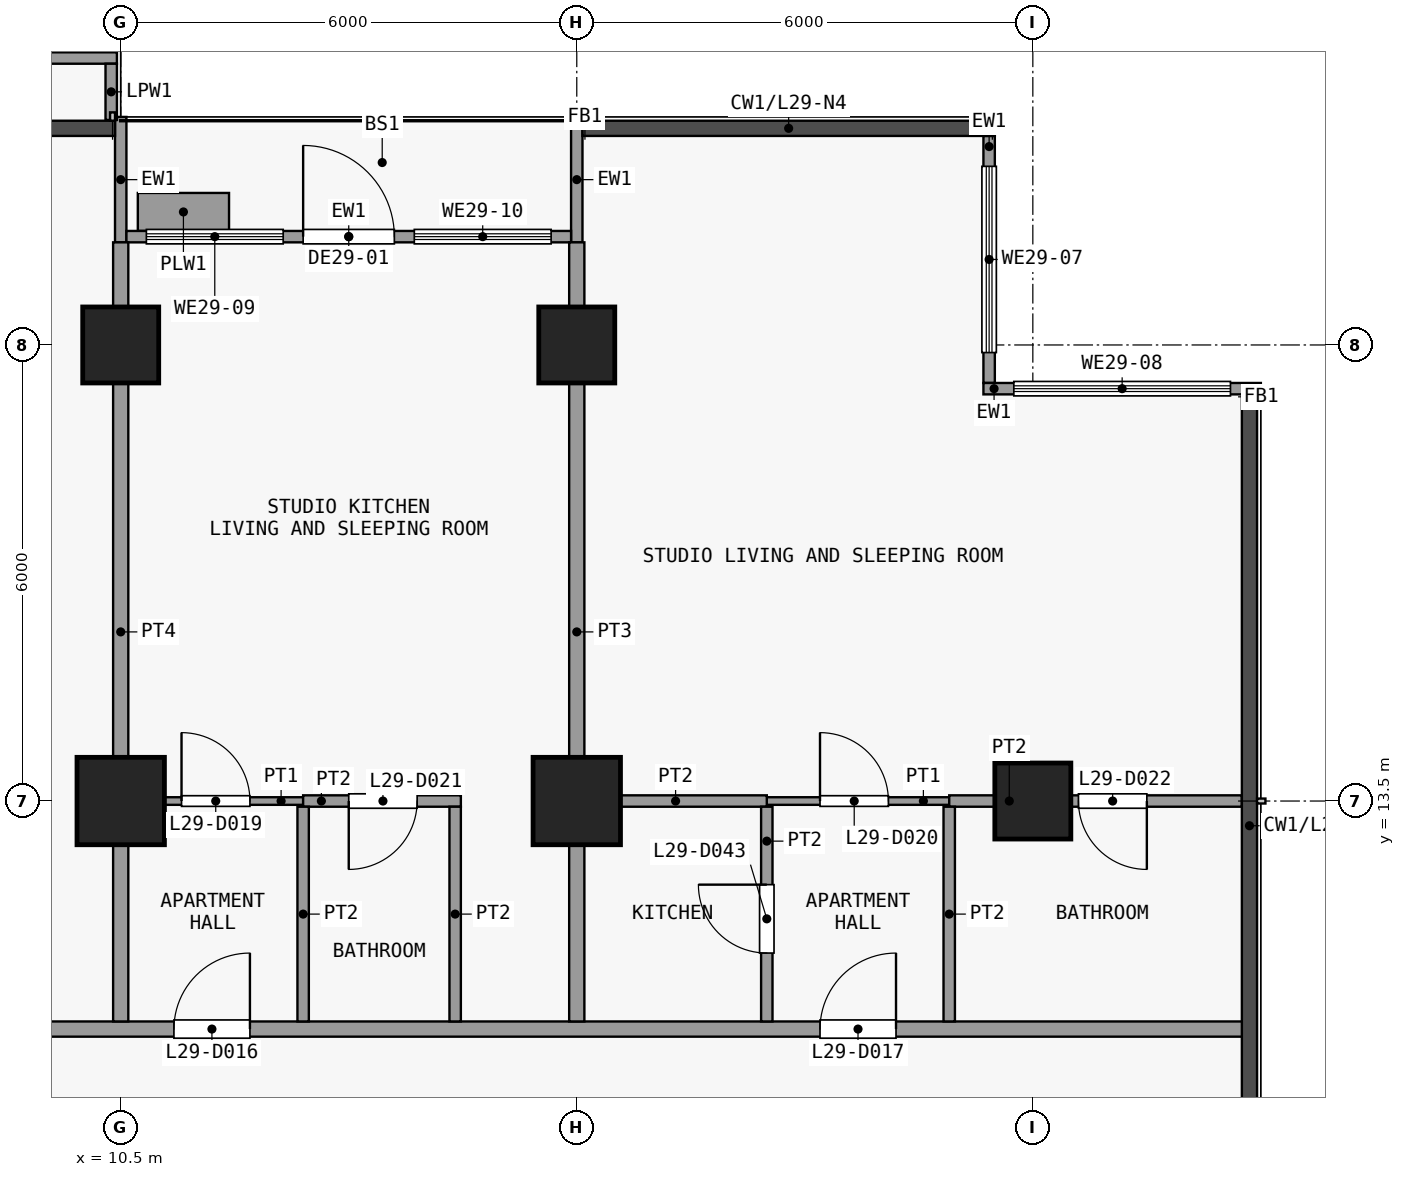
"""IFC4 building model, lengths in metres.
Left out: names, types, materials, properties, quantities, classifications, styles, units other than length and angle.
Written with IfcOpenShell. Run it as: python <this file> out.ifc"""

import sys

from ifc_helpers import new_model, si_unit, direction, frame, frame_2d, origin, origin_2d, place, context, subcontext, project, spatial, rectangle, extrude, element, fill, save


model = new_model("IFC4")
c1 = context("Model", 3, precision=1e-05, world=origin(), true_north=direction((0.0, 1.0)))
c2 = subcontext(c1, "Body", "Model", "MODEL_VIEW")
j1 = project(units=[si_unit("LENGTHUNIT", "METRE"), si_unit("PLANEANGLEUNIT", "RADIAN")], contexts=[c1])
p1 = place(None, origin())
s1 = spatial("IfcSite", under=j1, at=p1, CompositionType="ELEMENT")
p2 = place(p1, origin())
s2 = spatial("IfcBuilding", under=s1, at=p2, CompositionType="ELEMENT")
p3 = place(p2, frame((0.0, 0.0, 117.1)))
s3 = spatial("IfcBuildingStorey", under=s2, at=p3, CompositionType="ELEMENT", Elevation=117.1)
p4 = place(p3, frame((10.5, 13.5, 0.0), z_axis=(0.0, 0.0, 1.0), x_axis=(1.0, 0.0, 0.0)))
e1 = element("IfcColumn", 1, at=p4, inside=s3, PredefinedType="COLUMN", context=c2, shape_type="SweptSolid", body=[
    extrude(rectangle(XDim=1.15, YDim=1.15, at=origin_2d()), origin(), (0.0, 0.0, 1.0), 3.6),
])
p5 = place(p3, frame((10.5, 19.5, 0.0), z_axis=(0.0, 0.0, 1.0), x_axis=(1.0, 0.0, 0.0)))
e2 = element("IfcColumn", 2, at=p5, inside=s3, PredefinedType="COLUMN", context=c2, shape_type="SweptSolid", body=[
    extrude(rectangle(XDim=1.0, YDim=1.0, at=origin_2d()), origin(), (0.0, 0.0, 1.0), 3.6),
])
p6 = place(p3, frame((16.5, 13.5, 0.0), z_axis=(0.0, 0.0, 1.0), x_axis=(1.0, 0.0, 0.0)))
e3 = element("IfcColumn", 3, at=p6, inside=s3, PredefinedType="COLUMN", context=c2, shape_type="SweptSolid", body=[
    extrude(rectangle(XDim=1.15, YDim=1.15, at=origin_2d()), origin(), (0.0, 0.0, 1.0), 3.6),
])
for number, where, z_axis, x_axis in (
    (4, (16.5, 19.5, 0.0), (0.0, 0.0, 1.0), (1.0, 0.0, 0.0)),
    (5, (22.5, 13.5, 0.0), (0.0, 0.0, 1.0), (1.0, 0.0, 0.0)),
):
    element("IfcColumn", number, at=place(p3, frame(where, z_axis=z_axis, x_axis=x_axis)), inside=s3, PredefinedType="COLUMN", context=c2, shape_type="SweptSolid", body=[
        extrude(rectangle(XDim=1.0, YDim=1.0, at=origin_2d()), origin(), (0.0, 0.0, 1.0), 3.6),
    ])
p7 = place(p3, frame((21.925, 22.25, 0.0), z_axis=(0.0, 0.0, 1.0), x_axis=(0.0, -1.0, 0.0)))
e6 = element("IfcWall", 6, at=p7, inside=s3, PredefinedType="SOLIDWALL", context=c2, shape_type="SweptSolid", body=[
    extrude(rectangle(XDim=3.25, YDim=0.15, at=frame_2d((1.625, 0.0))), origin(), (0.0, 0.0, 1.0), 3.3),
])
p8 = place(p7, frame((0.4, 0.0, 0.9)))
e7 = element("IfcOpeningElement", 7, at=p8, cuts=e6, PredefinedType="OPENING", context=c2, shape_type="SweptSolid", body=[
    extrude(rectangle(XDim=2.45, YDim=2.4, at=frame_2d((1.225, 1.2))), frame((0.0, 0.085, 0.0), z_axis=(0.0, -1.0, 0.0), x_axis=(1.0, 0.0, 0.0)), (0.0, 0.0, 1.0), 0.17),
])
p9 = place(p3, frame((21.85, 18.925, 0.0), z_axis=(0.0, 0.0, 1.0), x_axis=(1.0, 0.0, 0.0)))
e8 = element("IfcWall", 8, at=p9, inside=s3, PredefinedType="SOLIDWALL", context=c2, shape_type="SweptSolid", body=[
    extrude(rectangle(XDim=3.65, YDim=0.15, at=frame_2d((1.825, 0.0))), origin(), (0.0, 0.0, 1.0), 3.3),
])
p10 = place(p9, frame((0.4, 0.0, 0.9)))
e9 = element("IfcOpeningElement", 9, at=p10, cuts=e8, PredefinedType="OPENING", context=c2, shape_type="SweptSolid", body=[
    extrude(rectangle(XDim=2.85, YDim=2.4, at=frame_2d((1.425, 1.2))), frame((0.0, 0.085, 0.0), z_axis=(0.0, -1.0, 0.0), x_axis=(1.0, 0.0, 0.0)), (0.0, 0.0, 1.0), 0.17),
])
for number, where, z_axis, x_axis in (
    (10, (10.5, 20.85, 0.0), (0.0, 0.0, 1.0), (0.0, 1.0, 0.0)),
    (11, (16.5, 20.85, 0.0), (0.0, 0.0, 1.0), (0.0, 1.0, 0.0)),
):
    element("IfcWall", number, at=place(p3, frame(where, z_axis=z_axis, x_axis=x_axis)), inside=s3, PredefinedType="SOLIDWALL", context=c2, shape_type="SweptSolid", body=[
        extrude(rectangle(XDim=1.65, YDim=0.15, at=frame_2d((0.825, 0.0))), origin(), (0.0, 0.0, 1.0), 3.3),
    ])
p11 = place(p3, frame((10.575, 20.925, 0.0), z_axis=(0.0, 0.0, 1.0), x_axis=(1.0, 0.0, 0.0)))
e12 = element("IfcWall", 12, at=p11, inside=s3, PredefinedType="SOLIDWALL", context=c2, shape_type="SweptSolid", body=[
    extrude(rectangle(XDim=5.85, YDim=0.15, at=frame_2d((2.925, 0.0))), origin(), (0.0, 0.0, 1.0), 3.3),
])
p12 = place(p11, frame((2.325, 0.0, 0.0)))
e13 = element("IfcOpeningElement", 13, at=p12, cuts=e12, PredefinedType="OPENING", context=c2, shape_type="SweptSolid", body=[
    extrude(rectangle(XDim=1.2, YDim=2.4, at=frame_2d((0.6, 1.2))), frame((0.0, 0.085, 0.0), z_axis=(0.0, -1.0, 0.0), x_axis=(1.0, 0.0, 0.0)), (0.0, 0.0, 1.0), 0.17),
])
p13 = place(p11, frame((0.262, 0.0, 0.9)))
e14 = element("IfcOpeningElement", 14, at=p13, cuts=e12, PredefinedType="OPENING", context=c2, shape_type="SweptSolid", body=[
    extrude(rectangle(XDim=1.8, YDim=2.1, at=frame_2d((0.9, 1.05))), frame((0.0, 0.085, 0.0), z_axis=(0.0, -1.0, 0.0), x_axis=(1.0, 0.0, 0.0)), (0.0, 0.0, 1.0), 0.17),
])
p14 = place(p11, frame((3.788, 0.0, 0.9)))
e15 = element("IfcOpeningElement", 15, at=p14, cuts=e12, PredefinedType="OPENING", context=c2, shape_type="SweptSolid", body=[
    extrude(rectangle(XDim=1.8, YDim=2.1, at=frame_2d((0.9, 1.05))), frame((0.0, 0.085, 0.0), z_axis=(0.0, -1.0, 0.0), x_axis=(1.0, 0.0, 0.0)), (0.0, 0.0, 1.0), 0.17),
])
p15 = place(p3, frame((10.725, 21.25, 0.0), z_axis=(0.0, 0.0, 1.0), x_axis=(1.0, 0.0, 0.0)))
e16 = element("IfcWall", 16, at=p15, inside=s3, PredefinedType="USERDEFINED", context=c2, shape_type="SweptSolid", body=[
    extrude(rectangle(XDim=1.2, YDim=0.5, at=frame_2d((0.6, 0.0))), origin(), (0.0, 0.0, 1.0), 0.9),
])
p16 = place(p3, frame((4.7, 23.275, 0.0), z_axis=(0.0, 0.0, 1.0), x_axis=(1.0, 0.0, 0.0)))
e17 = element("IfcWall", 17, at=p16, inside=s3, PredefinedType="PARAPET", context=c2, shape_type="SweptSolid", body=[
    extrude(rectangle(XDim=5.75, YDim=0.15, at=frame_2d((2.875, 0.0))), origin(), (0.0, 0.0, 1.0), 1.15),
])
p17 = place(p3, frame((10.375, 23.2, 0.0), z_axis=(0.0, 0.0, 1.0), x_axis=(0.0, -1.0, 0.0)))
e18 = element("IfcWall", 18, at=p17, inside=s3, PredefinedType="PARAPET", context=c2, shape_type="SweptSolid", body=[
    extrude(rectangle(XDim=0.74, YDim=0.15, at=frame_2d((0.37, 0.0))), origin(), (0.0, 0.0, 1.0), 1.15),
])
p18 = place(p3, frame((-25.35, 10.5, 0.0), z_axis=(0.0, 0.0, 1.0), x_axis=(1.0, 0.0, 0.0)))
e19 = element("IfcWall", 19, at=p18, inside=s3, PredefinedType="PARTITIONING", context=c2, shape_type="SweptSolid", body=[
    extrude(rectangle(XDim=50.7, YDim=0.2, at=frame_2d((25.35, 0.0))), origin(), (0.0, 0.0, 1.0), 3.3),
])
p19 = place(p18, frame((10.55, 0.0, 0.0)))
e20 = element("IfcOpeningElement", 20, at=p19, cuts=e19, PredefinedType="OPENING", context=c2, shape_type="SweptSolid", body=[
    extrude(rectangle(XDim=1.0, YDim=2.1, at=frame_2d((0.5, 1.05))), frame((0.0, 0.11, 0.0), z_axis=(0.0, -1.0, 0.0), x_axis=(1.0, 0.0, 0.0)), (0.0, 0.0, 1.0), 0.22),
])
p20 = place(p18, frame((17.35, 0.0, 0.0)))
e21 = element("IfcOpeningElement", 21, at=p20, cuts=e19, PredefinedType="OPENING", context=c2, shape_type="SweptSolid", body=[
    extrude(rectangle(XDim=0.9, YDim=2.1, at=frame_2d((0.45, 1.05))), frame((0.0, 0.11, 0.0), z_axis=(0.0, -1.0, 0.0), x_axis=(1.0, 0.0, 0.0)), (0.0, 0.0, 1.0), 0.22),
])
p21 = place(p18, frame((24.85, 0.0, 0.0)))
e22 = element("IfcOpeningElement", 22, at=p21, cuts=e19, PredefinedType="OPENING", context=c2, shape_type="SweptSolid", body=[
    extrude(rectangle(XDim=0.9, YDim=2.1, at=frame_2d((0.45, 1.05))), frame((0.0, 0.11, 0.0), z_axis=(0.0, -1.0, 0.0), x_axis=(1.0, 0.0, 0.0)), (0.0, 0.0, 1.0), 0.22),
])
p22 = place(p18, frame((32.35, 0.0, 0.0)))
e23 = element("IfcOpeningElement", 23, at=p22, cuts=e19, PredefinedType="OPENING", context=c2, shape_type="SweptSolid", body=[
    extrude(rectangle(XDim=0.9, YDim=2.1, at=frame_2d((0.45, 1.05))), frame((0.0, 0.11, 0.0), z_axis=(0.0, -1.0, 0.0), x_axis=(1.0, 0.0, 0.0)), (0.0, 0.0, 1.0), 0.22),
])
p23 = place(p18, frame((36.55, 0.0, 0.0)))
e24 = element("IfcOpeningElement", 24, at=p23, cuts=e19, PredefinedType="OPENING", context=c2, shape_type="SweptSolid", body=[
    extrude(rectangle(XDim=1.0, YDim=2.1, at=frame_2d((0.5, 1.05))), frame((0.0, 0.11, 0.0), z_axis=(0.0, -1.0, 0.0), x_axis=(1.0, 0.0, 0.0)), (0.0, 0.0, 1.0), 0.22),
])
p24 = place(p18, frame((45.05, 0.0, 0.0)))
e25 = element("IfcOpeningElement", 25, at=p24, cuts=e19, PredefinedType="OPENING", context=c2, shape_type="SweptSolid", body=[
    extrude(rectangle(XDim=1.0, YDim=2.1, at=frame_2d((0.5, 1.05))), frame((0.0, 0.11, 0.0), z_axis=(0.0, -1.0, 0.0), x_axis=(1.0, 0.0, 0.0)), (0.0, 0.0, 1.0), 0.22),
])
p25 = place(p3, frame((10.6, 13.5, 0.0), z_axis=(0.0, 0.0, 1.0), x_axis=(1.0, 0.0, 0.0)))
e26 = element("IfcWall", 26, at=p25, inside=s3, PredefinedType="PARTITIONING", context=c2, shape_type="SweptSolid", body=[
    extrude(rectangle(XDim=2.3, YDim=0.1, at=frame_2d((1.15, 0.0))), origin(), (0.0, 0.0, 1.0), 3.3),
])
p26 = place(p25, frame((0.7, 0.0, 0.0)))
e27 = element("IfcOpeningElement", 27, at=p26, cuts=e26, PredefinedType="OPENING", context=c2, shape_type="SweptSolid", body=[
    extrude(rectangle(XDim=0.9, YDim=2.1, at=frame_2d((0.45, 1.05))), frame((0.0, 0.06, 0.0), z_axis=(0.0, -1.0, 0.0), x_axis=(1.0, 0.0, 0.0)), (0.0, 0.0, 1.0), 0.12),
])
p27 = place(p3, frame((19.0, 13.5, 0.0), z_axis=(0.0, 0.0, 1.0), x_axis=(1.0, 0.0, 0.0)))
e28 = element("IfcWall", 28, at=p27, inside=s3, PredefinedType="PARTITIONING", context=c2, shape_type="SweptSolid", body=[
    extrude(rectangle(XDim=2.4, YDim=0.1, at=frame_2d((1.2, 0.0))), origin(), (0.0, 0.0, 1.0), 3.3),
])
p28 = place(p27, frame((0.7, 0.0, 0.0)))
e29 = element("IfcOpeningElement", 29, at=p28, cuts=e28, PredefinedType="OPENING", context=c2, shape_type="SweptSolid", body=[
    extrude(rectangle(XDim=0.9, YDim=2.1, at=frame_2d((0.45, 1.05))), frame((0.0, 0.06, 0.0), z_axis=(0.0, -1.0, 0.0), x_axis=(1.0, 0.0, 0.0)), (0.0, 0.0, 1.0), 0.12),
])
p29 = place(p3, frame((12.9, 13.5, 0.0), z_axis=(0.0, 0.0, 1.0), x_axis=(1.0, 0.0, 0.0)))
e30 = element("IfcWall", 30, at=p29, inside=s3, PredefinedType="PARTITIONING", context=c2, shape_type="SweptSolid", body=[
    extrude(rectangle(XDim=2.075, YDim=0.15, at=frame_2d((1.038, 0.0))), origin(), (0.0, 0.0, 1.0), 3.3),
])
p30 = place(p29, frame((0.6, 0.0, 0.0)))
e31 = element("IfcOpeningElement", 31, at=p30, cuts=e30, PredefinedType="OPENING", context=c2, shape_type="SweptSolid", body=[
    extrude(rectangle(XDim=0.9, YDim=2.1, at=frame_2d((0.45, 1.05))), frame((0.0, 0.085, 0.0), z_axis=(0.0, -1.0, 0.0), x_axis=(1.0, 0.0, 0.0)), (0.0, 0.0, 1.0), 0.17),
])
p31 = place(p3, frame((16.6, 13.5, 0.0), z_axis=(0.0, 0.0, 1.0), x_axis=(1.0, 0.0, 0.0)))
e32 = element("IfcWall", 32, at=p31, inside=s3, PredefinedType="PARTITIONING", context=c2, shape_type="SweptSolid", body=[
    extrude(rectangle(XDim=2.4, YDim=0.15, at=frame_2d((1.2, 0.0))), origin(), (0.0, 0.0, 1.0), 3.3),
])
p32 = place(p3, frame((21.4, 13.5, 0.0), z_axis=(0.0, 0.0, 1.0), x_axis=(1.0, 0.0, 0.0)))
e33 = element("IfcWall", 33, at=p32, inside=s3, PredefinedType="PARTITIONING", context=c2, shape_type="SweptSolid", body=[
    extrude(rectangle(XDim=3.85, YDim=0.15, at=frame_2d((1.925, 0.0))), origin(), (0.0, 0.0, 1.0), 3.3),
])
p33 = place(p32, frame((1.7, 0.0, 0.0)))
e34 = element("IfcOpeningElement", 34, at=p33, cuts=e33, PredefinedType="OPENING", context=c2, shape_type="SweptSolid", body=[
    extrude(rectangle(XDim=0.9, YDim=2.1, at=frame_2d((0.45, 1.05))), frame((0.0, 0.085, 0.0), z_axis=(0.0, -1.0, 0.0), x_axis=(1.0, 0.0, 0.0)), (0.0, 0.0, 1.0), 0.17),
])
p34 = place(p3, frame((10.5, 10.6, 0.0), z_axis=(0.0, 0.0, 1.0), x_axis=(0.0, 1.0, 0.0)))
e35 = element("IfcWall", 35, at=p34, inside=s3, PredefinedType="PARTITIONING", context=c2, shape_type="SweptSolid", body=[
    extrude(rectangle(XDim=10.25, YDim=0.2, at=frame_2d((5.125, 0.0))), origin(), (0.0, 0.0, 1.0), 3.3),
])
for number, where, z_axis, x_axis in (
    (36, (12.9, 10.6, 0.0), (0.0, 0.0, 1.0), (0.0, 1.0, 0.0)),
    (37, (14.9, 10.6, 0.0), (0.0, 0.0, 1.0), (0.0, 1.0, 0.0)),
):
    element("IfcWall", number, at=place(p3, frame(where, z_axis=z_axis, x_axis=x_axis)), inside=s3, PredefinedType="PARTITIONING", context=c2, shape_type="SweptSolid", body=[
        extrude(rectangle(XDim=2.825, YDim=0.15, at=frame_2d((1.413, 0.0))), origin(), (0.0, 0.0, 1.0), 3.3),
    ])
p35 = place(p3, frame((16.5, 10.6, 0.0), z_axis=(0.0, 0.0, 1.0), x_axis=(0.0, 1.0, 0.0)))
e38 = element("IfcWall", 38, at=p35, inside=s3, PredefinedType="PARTITIONING", context=c2, shape_type="SweptSolid", body=[
    extrude(rectangle(XDim=10.25, YDim=0.2, at=frame_2d((5.125, 0.0))), origin(), (0.0, 0.0, 1.0), 3.3),
])
p36 = place(p3, frame((19.0, 10.6, 0.0), z_axis=(0.0, 0.0, 1.0), x_axis=(0.0, 1.0, 0.0)))
e39 = element("IfcWall", 39, at=p36, inside=s3, PredefinedType="PARTITIONING", context=c2, shape_type="SweptSolid", body=[
    extrude(rectangle(XDim=2.825, YDim=0.15, at=frame_2d((1.413, 0.0))), origin(), (0.0, 0.0, 1.0), 3.3),
])
p37 = place(p36, frame((0.9, 0.0, 0.0)))
e40 = element("IfcOpeningElement", 40, at=p37, cuts=e39, PredefinedType="OPENING", context=c2, shape_type="SweptSolid", body=[
    extrude(rectangle(XDim=0.9, YDim=2.1, at=frame_2d((0.45, 1.05))), frame((0.0, 0.085, 0.0), z_axis=(0.0, -1.0, 0.0), x_axis=(1.0, 0.0, 0.0)), (0.0, 0.0, 1.0), 0.17),
])
p38 = place(p3, frame((21.4, 10.6, 0.0), z_axis=(0.0, 0.0, 1.0), x_axis=(0.0, 1.0, 0.0)))
e41 = element("IfcWall", 41, at=p38, inside=s3, PredefinedType="PARTITIONING", context=c2, shape_type="SweptSolid", body=[
    extrude(rectangle(XDim=2.825, YDim=0.15, at=frame_2d((1.413, 0.0))), origin(), (0.0, 0.0, 1.0), 3.3),
])
p39 = place(p8, origin())
e42 = element("IfcWindow", 42, at=p39, inside=s3, PartitioningType="SINGLE_PANEL", PredefinedType="WINDOW", context=c2, shape_type="SweptSolid", body=[
    extrude(rectangle(XDim=2.45, YDim=2.4, at=frame_2d((1.225, 1.2))), frame((0.0, 0.03, 0.0), z_axis=(0.0, -1.0, 0.0), x_axis=(1.0, 0.0, 0.0)), (0.0, 0.0, 1.0), 0.06),
])
fill(e7, e42)
p40 = place(p10, origin())
e43 = element("IfcWindow", 43, at=p40, inside=s3, PartitioningType="SINGLE_PANEL", PredefinedType="WINDOW", context=c2, shape_type="SweptSolid", body=[
    extrude(rectangle(XDim=2.85, YDim=2.4, at=frame_2d((1.425, 1.2))), frame((0.0, 0.03, 0.0), z_axis=(0.0, -1.0, 0.0), x_axis=(1.0, 0.0, 0.0)), (0.0, 0.0, 1.0), 0.06),
])
fill(e9, e43)
p41 = place(p12, origin())
e44 = element("IfcDoor", 44, at=p41, inside=s3, OperationType="SINGLE_SWING_LEFT", PredefinedType="DOOR", context=c2, shape_type="SweptSolid", body=[
    extrude(rectangle(XDim=1.2, YDim=2.4, at=frame_2d((0.6, 1.2))), frame((0.0, 0.025, 0.0), z_axis=(0.0, -1.0, 0.0), x_axis=(1.0, 0.0, 0.0)), (0.0, 0.0, 1.0), 0.05),
])
fill(e13, e44)
p42 = place(p13, origin())
e45 = element("IfcWindow", 45, at=p42, inside=s3, PartitioningType="SINGLE_PANEL", PredefinedType="WINDOW", context=c2, shape_type="SweptSolid", body=[
    extrude(rectangle(XDim=1.8, YDim=2.1, at=frame_2d((0.9, 1.05))), frame((0.0, 0.03, 0.0), z_axis=(0.0, -1.0, 0.0), x_axis=(1.0, 0.0, 0.0)), (0.0, 0.0, 1.0), 0.06),
])
fill(e14, e45)
p43 = place(p14, origin())
e46 = element("IfcWindow", 46, at=p43, inside=s3, PartitioningType="SINGLE_PANEL", PredefinedType="WINDOW", context=c2, shape_type="SweptSolid", body=[
    extrude(rectangle(XDim=1.8, YDim=2.1, at=frame_2d((0.9, 1.05))), frame((0.0, 0.03, 0.0), z_axis=(0.0, -1.0, 0.0), x_axis=(1.0, 0.0, 0.0)), (0.0, 0.0, 1.0), 0.06),
])
fill(e15, e46)
p44 = place(p23, origin())
e47 = element("IfcDoor", 47, at=p44, inside=s3, OperationType="SINGLE_SWING_LEFT", PredefinedType="DOOR", context=c2, shape_type="SweptSolid", body=[
    extrude(rectangle(XDim=1.0, YDim=2.1, at=frame_2d((0.5, 1.05))), frame((0.0, 0.025, 0.0), z_axis=(0.0, -1.0, 0.0), x_axis=(1.0, 0.0, 0.0)), (0.0, 0.0, 1.0), 0.05),
])
fill(e24, e47)
p45 = place(p24, origin())
e48 = element("IfcDoor", 48, at=p45, inside=s3, OperationType="SINGLE_SWING_LEFT", PredefinedType="DOOR", context=c2, shape_type="SweptSolid", body=[
    extrude(rectangle(XDim=1.0, YDim=2.1, at=frame_2d((0.5, 1.05))), frame((0.0, 0.025, 0.0), z_axis=(0.0, -1.0, 0.0), x_axis=(1.0, 0.0, 0.0)), (0.0, 0.0, 1.0), 0.05),
])
fill(e25, e48)
p46 = place(p26, origin())
e49 = element("IfcDoor", 49, at=p46, inside=s3, OperationType="SINGLE_SWING_RIGHT", PredefinedType="DOOR", context=c2, shape_type="SweptSolid", body=[
    extrude(rectangle(XDim=0.9, YDim=2.1, at=frame_2d((0.45, 1.05))), frame((0.0, 0.025, 0.0), z_axis=(0.0, -1.0, 0.0), x_axis=(1.0, 0.0, 0.0)), (0.0, 0.0, 1.0), 0.05),
])
fill(e27, e49)
p47 = place(p28, origin())
e50 = element("IfcDoor", 50, at=p47, inside=s3, OperationType="SINGLE_SWING_RIGHT", PredefinedType="DOOR", context=c2, shape_type="SweptSolid", body=[
    extrude(rectangle(XDim=0.9, YDim=2.1, at=frame_2d((0.45, 1.05))), frame((0.0, 0.025, 0.0), z_axis=(0.0, -1.0, 0.0), x_axis=(1.0, 0.0, 0.0)), (0.0, 0.0, 1.0), 0.05),
])
fill(e29, e50)
p48 = place(p30, origin())
e51 = element("IfcDoor", 51, at=p48, inside=s3, OperationType="SINGLE_SWING_LEFT", PredefinedType="DOOR", context=c2, shape_type="SweptSolid", body=[
    extrude(rectangle(XDim=0.9, YDim=2.1, at=frame_2d((0.45, 1.05))), frame((0.0, 0.025, 0.0), z_axis=(0.0, -1.0, 0.0), x_axis=(1.0, 0.0, 0.0)), (0.0, 0.0, 1.0), 0.05),
])
fill(e31, e51)
p49 = place(p33, origin())
e52 = element("IfcDoor", 52, at=p49, inside=s3, OperationType="SINGLE_SWING_RIGHT", PredefinedType="DOOR", context=c2, shape_type="SweptSolid", body=[
    extrude(rectangle(XDim=0.9, YDim=2.1, at=frame_2d((0.45, 1.05))), frame((0.0, 0.025, 0.0), z_axis=(0.0, -1.0, 0.0), x_axis=(1.0, 0.0, 0.0)), (0.0, 0.0, 1.0), 0.05),
])
fill(e34, e52)
p50 = place(p37, origin())
e53 = element("IfcDoor", 53, at=p50, inside=s3, OperationType="SINGLE_SWING_LEFT", PredefinedType="DOOR", context=c2, shape_type="SweptSolid", body=[
    extrude(rectangle(XDim=0.9, YDim=2.1, at=frame_2d((0.45, 1.05))), frame((0.0, 0.025, 0.0), z_axis=(0.0, -1.0, 0.0), x_axis=(1.0, 0.0, 0.0)), (0.0, 0.0, 1.0), 0.05),
])
fill(e40, e53)
save(model, sys.argv[1])
